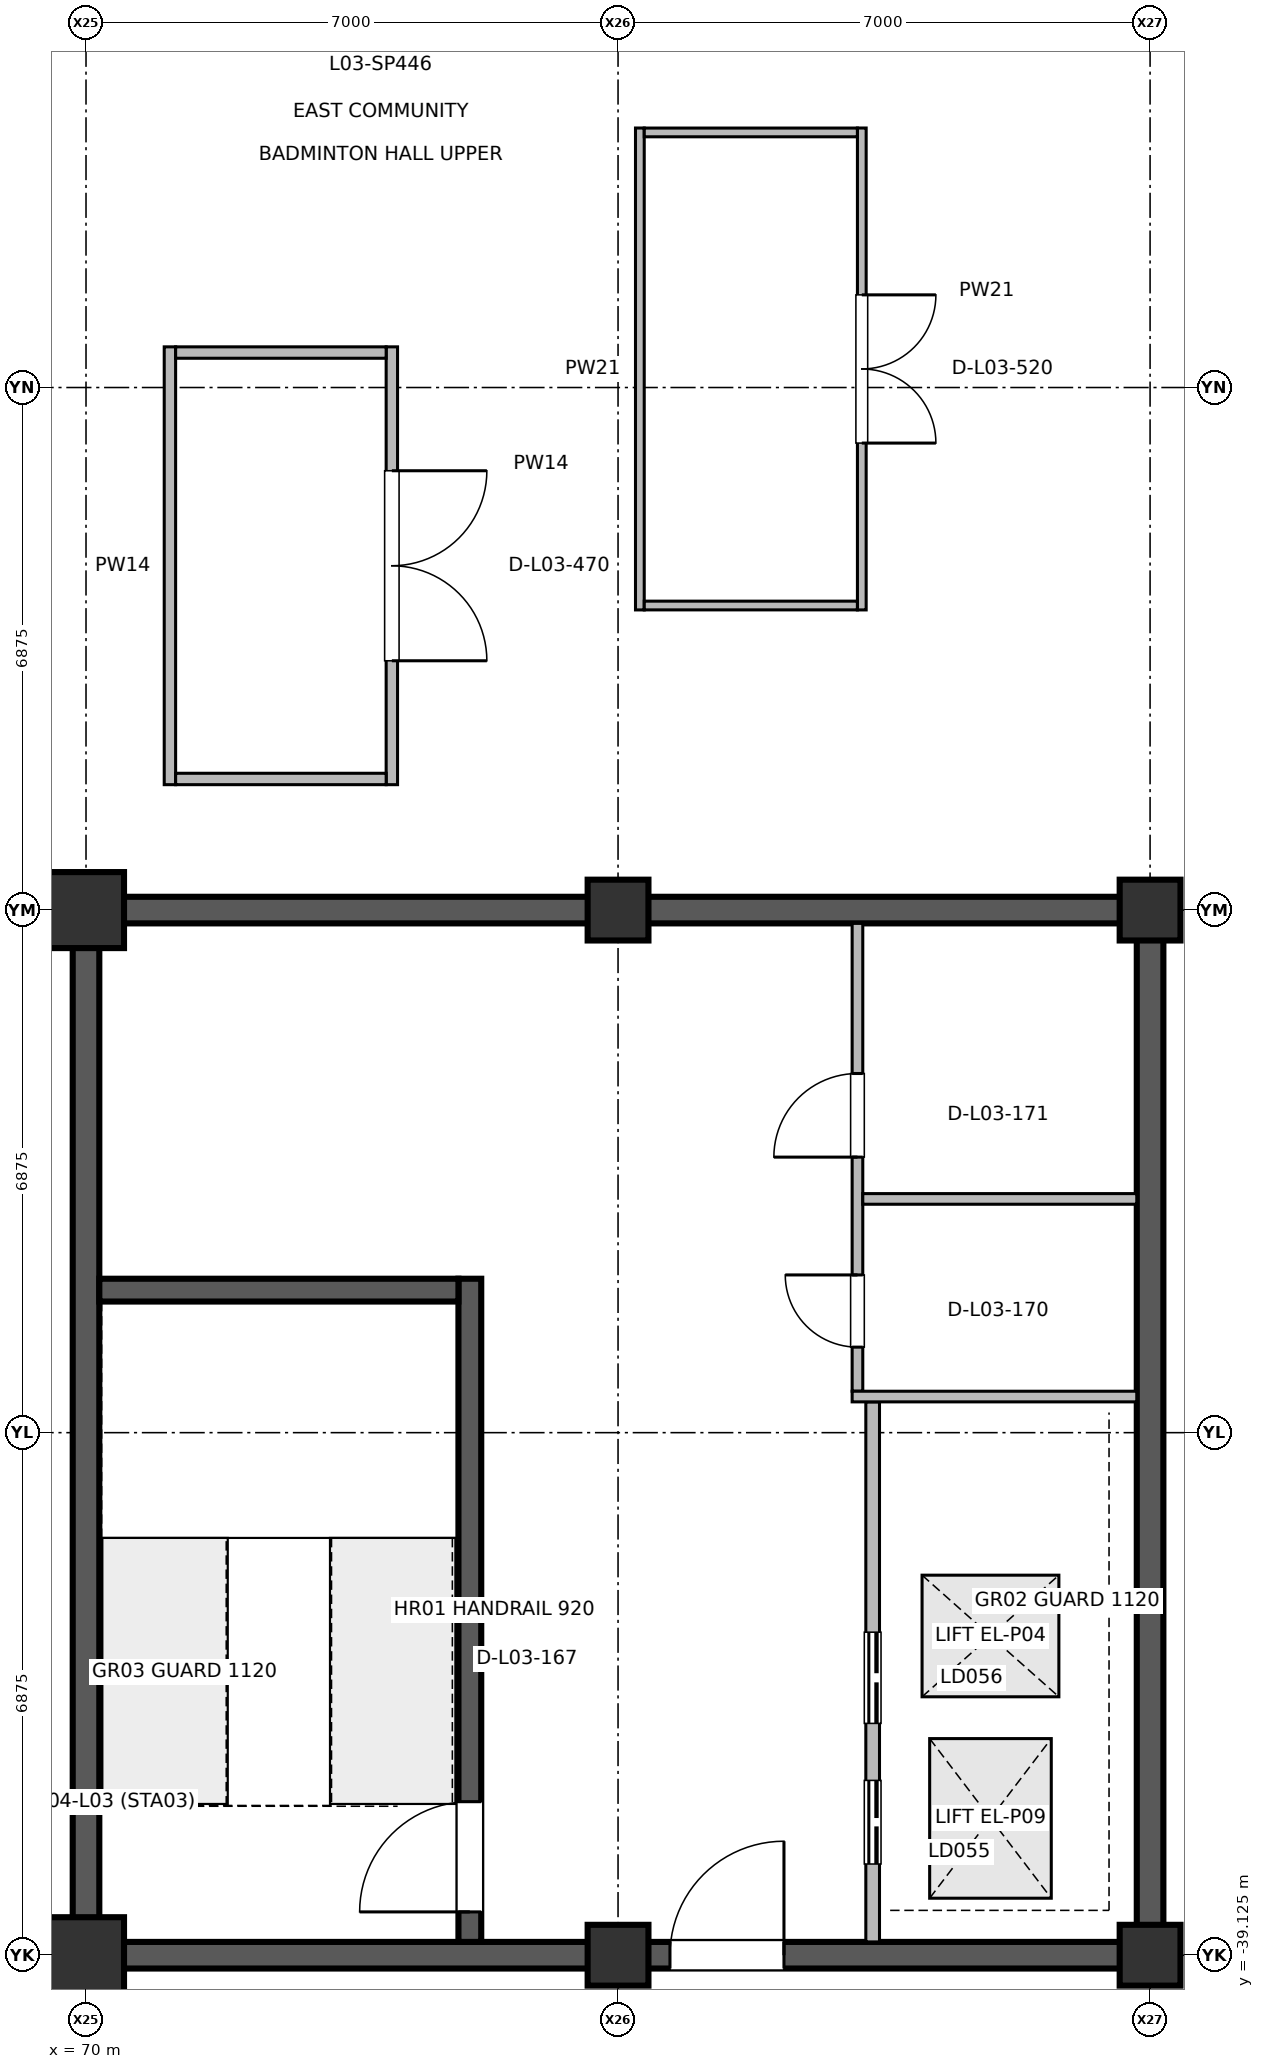
"""IFC4 building model, lengths in metres.
Left out: names, types, materials, properties, quantities, classifications, styles, units other than length and angle.
Written with IfcOpenShell. Run it as: python <this file> out.ifc"""

import sys

from ifc_helpers import new_model, si_unit, direction, frame, frame_2d, origin, origin_2d, place, context, subcontext, project, spatial, rectangle, extrude, element, fill, save


model = new_model("IFC4")
c1 = context("Model", 3, precision=1e-05, world=origin(), true_north=direction((0.0, 1.0)))
c2 = subcontext(c1, "Body", "Model", "MODEL_VIEW")
j1 = project(units=[si_unit("LENGTHUNIT", "METRE"), si_unit("PLANEANGLEUNIT", "RADIAN")], contexts=[c1])
p1 = place(None, origin())
s1 = spatial("IfcSite", under=j1, at=p1, CompositionType="ELEMENT")
p2 = place(p1, origin())
s2 = spatial("IfcBuilding", under=s1, at=p2, CompositionType="ELEMENT")
p3 = place(p2, frame((0.0, 0.0, 11.4)))
s3 = spatial("IfcBuildingStorey", under=s2, at=p3, CompositionType="ELEMENT", Elevation=11.4)
for number, where, z_axis, x_axis in (
    (1, (70.0, -39.125, 0.0), (0.0, 0.0, 1.0), (1.0, 0.0, 0.0)),
    (2, (70.0, -25.375, 0.0), (0.0, 0.0, 1.0), (1.0, 0.0, 0.0)),
):
    element("IfcColumn", number, at=place(p3, frame(where, z_axis=z_axis, x_axis=x_axis)), inside=s3, PredefinedType="COLUMN", context=c2, shape_type="SweptSolid", body=[
        extrude(rectangle(XDim=1.0, YDim=1.0, at=origin_2d()), origin(), (0.0, 0.0, 1.0), 4.798),
    ])
for number, where, z_axis, x_axis in (
    (3, (77.0, -39.125, 0.0), (0.0, 0.0, 1.0), (1.0, 0.0, 0.0)),
    (4, (77.0, -25.375, 0.0), (0.0, 0.0, 1.0), (1.0, 0.0, 0.0)),
    (5, (84.0, -39.125, 0.0), (0.0, 0.0, 1.0), (1.0, 0.0, 0.0)),
    (6, (84.0, -25.375, 0.0), (0.0, 0.0, 1.0), (1.0, 0.0, 0.0)),
):
    element("IfcColumn", number, at=place(p3, frame(where, z_axis=z_axis, x_axis=x_axis)), inside=s3, PredefinedType="COLUMN", context=c2, shape_type="SweptSolid", body=[
        extrude(rectangle(XDim=0.8, YDim=0.8, at=origin_2d()), origin(), (0.0, 0.0, 1.0), 4.798),
    ])
for number, where, z_axis, x_axis in (
    (7, (70.0, -38.95, 0.0), (0.0, 0.0, 1.0), (0.0, 1.0, 0.0)),
    (8, (84.0, -38.95, 0.0), (0.0, 0.0, 1.0), (0.0, 1.0, 0.0)),
):
    element("IfcWall", number, at=place(p3, frame(where, z_axis=z_axis, x_axis=x_axis)), inside=s3, PredefinedType="SHEAR", context=c2, shape_type="SweptSolid", body=[
        extrude(rectangle(XDim=13.4, YDim=0.35, at=frame_2d((6.7, 0.0))), origin(), (0.0, 0.0, 1.0), 4.58),
    ])
p4 = place(p3, frame((70.175, -39.125, 0.0), z_axis=(0.0, 0.0, 1.0), x_axis=(1.0, 0.0, 0.0)))
e9 = element("IfcWall", 9, at=p4, inside=s3, PredefinedType="SHEAR", context=c2, shape_type="SweptSolid", body=[
    extrude(rectangle(XDim=13.65, YDim=0.35, at=frame_2d((6.825, 0.0))), origin(), (0.0, 0.0, 1.0), 4.58),
])
p5 = place(p4, frame((7.508, 0.0, 0.0)))
e10 = element("IfcOpeningElement", 10, at=p5, cuts=e9, PredefinedType="OPENING", context=c2, shape_type="SweptSolid", body=[
    extrude(rectangle(XDim=1.5, YDim=2.2, at=frame_2d((0.75, 1.1))), frame((0.0, 0.185, 0.0), z_axis=(0.0, -1.0, 0.0), x_axis=(1.0, 0.0, 0.0)), (0.0, 0.0, 1.0), 0.37),
])
p6 = place(p3, frame((70.175, -25.375, 0.0), z_axis=(0.0, 0.0, 1.0), x_axis=(1.0, 0.0, 0.0)))
e11 = element("IfcWall", 11, at=p6, inside=s3, PredefinedType="SHEAR", context=c2, shape_type="SweptSolid", body=[
    extrude(rectangle(XDim=13.65, YDim=0.35, at=frame_2d((6.825, 0.0))), origin(), (0.0, 0.0, 1.0), 4.58),
])
p7 = place(p3, frame((75.05, -38.95, 0.0), z_axis=(0.0, 0.0, 1.0), x_axis=(0.0, 1.0, 0.0)))
e12 = element("IfcWall", 12, at=p7, inside=s3, PredefinedType="SHEAR", context=c2, shape_type="SweptSolid", body=[
    extrude(rectangle(XDim=8.725, YDim=0.3, at=frame_2d((4.362, 0.0))), origin(), (0.0, 0.0, 1.0), 4.58),
])
p8 = place(p7, frame((0.395, 0.0, 0.0)))
e13 = element("IfcOpeningElement", 13, at=p8, cuts=e12, PredefinedType="OPENING", context=c2, shape_type="SweptSolid", body=[
    extrude(rectangle(XDim=1.45, YDim=2.2, at=frame_2d((0.725, 1.1))), frame((0.0, 0.16, 0.0), z_axis=(0.0, -1.0, 0.0), x_axis=(1.0, 0.0, 0.0)), (0.0, 0.0, 1.0), 0.32),
])
p9 = place(p3, frame((80.35, -38.95, 0.0), z_axis=(0.0, 0.0, 1.0), x_axis=(0.0, 1.0, 0.0)))
e14 = element("IfcWall", 14, at=p9, inside=s3, PredefinedType="PARTITIONING", context=c2, shape_type="SweptSolid", body=[
    extrude(rectangle(XDim=7.105, YDim=0.18, at=frame_2d((3.552, 0.0))), origin(), (0.0, 0.0, 1.0), 3.82),
])
p10 = place(p9, frame((1.025, 0.0, 0.0)))
e15 = element("IfcOpeningElement", 15, at=p10, cuts=e14, PredefinedType="OPENING", context=c2, shape_type="SweptSolid", body=[
    extrude(rectangle(XDim=1.1, YDim=2.2, at=frame_2d((0.55, 1.1))), frame((0.0, 0.1, 0.0), z_axis=(0.0, -1.0, 0.0), x_axis=(1.0, 0.0, 0.0)), (0.0, 0.0, 1.0), 0.2),
])
p11 = place(p9, frame((2.875, 0.0, 0.0)))
e16 = element("IfcOpeningElement", 16, at=p11, cuts=e14, PredefinedType="OPENING", context=c2, shape_type="SweptSolid", body=[
    extrude(rectangle(XDim=1.2, YDim=2.25, at=frame_2d((0.6, 1.125))), frame((0.0, 0.1, 0.0), z_axis=(0.0, -1.0, 0.0), x_axis=(1.0, 0.0, 0.0)), (0.0, 0.0, 1.0), 0.2),
])
p12 = place(p3, frame((80.15, -31.705, 0.0), z_axis=(0.0, 0.0, 1.0), x_axis=(0.0, 1.0, 0.0)))
e17 = element("IfcWall", 17, at=p12, inside=s3, PredefinedType="PARTITIONING", context=c2, shape_type="SweptSolid", body=[
    extrude(rectangle(XDim=6.155, YDim=0.14, at=frame_2d((3.078, 0.0))), origin(), (0.0, 0.0, 1.0), 3.82),
])
p13 = place(p12, frame((0.58, 0.0, 0.0)))
e18 = element("IfcOpeningElement", 18, at=p13, cuts=e17, PredefinedType="OPENING", context=c2, shape_type="SweptSolid", body=[
    extrude(rectangle(XDim=0.95, YDim=2.15, at=frame_2d((0.475, 1.075))), frame((0.0, 0.08, 0.0), z_axis=(0.0, -1.0, 0.0), x_axis=(1.0, 0.0, 0.0)), (0.0, 0.0, 1.0), 0.16),
])
p14 = place(p12, frame((3.08, 0.0, 0.0)))
e19 = element("IfcOpeningElement", 19, at=p14, cuts=e17, PredefinedType="OPENING", context=c2, shape_type="SweptSolid", body=[
    extrude(rectangle(XDim=1.1, YDim=2.15, at=frame_2d((0.55, 1.075))), frame((0.0, 0.08, 0.0), z_axis=(0.0, -1.0, 0.0), x_axis=(1.0, 0.0, 0.0)), (0.0, 0.0, 1.0), 0.16),
])
p15 = place(p3, frame((74.024, -17.965, 0.0), z_axis=(0.0, 0.0, 1.0), x_axis=(0.0, -1.0, 0.0)))
e20 = element("IfcWall", 20, at=p15, inside=s3, PredefinedType="PARTITIONING", context=c2, shape_type="SweptSolid", body=[
    extrude(rectangle(XDim=5.76, YDim=0.15, at=frame_2d((2.88, 0.0))), origin(), (0.0, 0.0, 1.0), 3.82),
])
p16 = place(p15, frame((1.63, 0.0, 0.0)))
e21 = element("IfcOpeningElement", 21, at=p16, cuts=e20, PredefinedType="OPENING", context=c2, shape_type="SweptSolid", body=[
    extrude(rectangle(XDim=2.5, YDim=2.5, at=frame_2d((1.25, 1.25))), frame((0.0, 0.085, 0.0), z_axis=(0.0, -1.0, 0.0), x_axis=(1.0, 0.0, 0.0)), (0.0, 0.0, 1.0), 0.17),
])
p17 = place(p3, frame((80.207, -15.086, 0.0), z_axis=(0.0, 0.0, 1.0), x_axis=(0.0, -1.0, 0.0)))
e22 = element("IfcWall", 22, at=p17, inside=s3, PredefinedType="PARTITIONING", context=c2, shape_type="SweptSolid", body=[
    extrude(rectangle(XDim=6.34, YDim=0.115, at=frame_2d((3.17, 0.0))), origin(), (0.0, 0.0, 1.0), 3.82),
])
p18 = place(p17, frame((2.195, 0.0, 0.0)))
e23 = element("IfcOpeningElement", 23, at=p18, cuts=e22, PredefinedType="OPENING", context=c2, shape_type="SweptSolid", body=[
    extrude(rectangle(XDim=1.95, YDim=2.35, at=frame_2d((0.975, 1.175))), frame((0.0, 0.067, 0.0), z_axis=(0.0, -1.0, 0.0), x_axis=(1.0, 0.0, 0.0)), (0.0, 0.0, 1.0), 0.135),
])
p19 = place(p3, frame((80.08, -31.775, 0.0), z_axis=(0.0, 0.0, 1.0), x_axis=(1.0, 0.0, 0.0)))
e24 = element("IfcWall", 24, at=p19, inside=s3, PredefinedType="PARTITIONING", context=c2, shape_type="SweptSolid", body=[
    extrude(rectangle(XDim=3.745, YDim=0.14, at=frame_2d((1.873, 0.0))), origin(), (0.0, 0.0, 1.0), 3.82),
])
p20 = place(p3, frame((80.22, -29.175, 0.0), z_axis=(0.0, 0.0, 1.0), x_axis=(1.0, 0.0, 0.0)))
e25 = element("IfcWall", 25, at=p20, inside=s3, PredefinedType="PARTITIONING", context=c2, shape_type="SweptSolid", body=[
    extrude(rectangle(XDim=3.605, YDim=0.14, at=frame_2d((1.802, 0.0))), origin(), (0.0, 0.0, 1.0), 3.82),
])
p21 = place(p3, frame((71.104, -23.725, 0.0), z_axis=(0.0, 0.0, 1.0), x_axis=(0.0, 1.0, 0.0)))
e26 = element("IfcWall", 26, at=p21, inside=s3, PredefinedType="PARTITIONING", context=c2, shape_type="SweptSolid", body=[
    extrude(rectangle(XDim=5.76, YDim=0.15, at=frame_2d((2.88, 0.0))), origin(), (0.0, 0.0, 1.0), 3.82),
])
for number, where, z_axis, x_axis in (
    (27, (71.179, -23.65, 0.0), (0.0, 0.0, 1.0), (1.0, 0.0, 0.0)),
    (28, (71.179, -18.04, 0.0), (0.0, 0.0, 1.0), (1.0, 0.0, 0.0)),
):
    element("IfcWall", number, at=place(p3, frame(where, z_axis=z_axis, x_axis=x_axis)), inside=s3, PredefinedType="PARTITIONING", context=c2, shape_type="SweptSolid", body=[
        extrude(rectangle(XDim=2.77, YDim=0.15, at=frame_2d((1.385, 0.0))), origin(), (0.0, 0.0, 1.0), 3.82),
    ])
p22 = place(p3, frame((77.287, -21.426, 0.0), z_axis=(0.0, 0.0, 1.0), x_axis=(0.0, 1.0, 0.0)))
e29 = element("IfcWall", 29, at=p22, inside=s3, PredefinedType="PARTITIONING", context=c2, shape_type="SweptSolid", body=[
    extrude(rectangle(XDim=6.34, YDim=0.115, at=frame_2d((3.17, 0.0))), origin(), (0.0, 0.0, 1.0), 3.355),
])
for number, where, z_axis, x_axis in (
    (30, (77.345, -21.368, 0.0), (0.0, 0.0, 1.0), (1.0, 0.0, 0.0)),
    (31, (77.345, -15.144, 0.0), (0.0, 0.0, 1.0), (1.0, 0.0, 0.0)),
):
    element("IfcWall", number, at=place(p3, frame(where, z_axis=z_axis, x_axis=x_axis)), inside=s3, PredefinedType="PARTITIONING", context=c2, shape_type="SweptSolid", body=[
        extrude(rectangle(XDim=2.804, YDim=0.115, at=frame_2d((1.402, 0.0))), origin(), (0.0, 0.0, 1.0), 3.355),
    ])
p23 = place(p3, frame((70.175, -30.375, 0.0), z_axis=(0.0, 0.0, 1.0), x_axis=(1.0, 0.0, 0.0)))
e32 = element("IfcWall", 32, at=p23, inside=s3, PredefinedType="SHEAR", context=c2, shape_type="SweptSolid", body=[
    extrude(rectangle(XDim=4.725, YDim=0.3, at=frame_2d((2.362, 0.0))), origin(), (0.0, 0.0, 1.0), 4.58),
])
p24 = place(p5, origin())
e33 = element("IfcDoor", 33, at=p24, inside=s3, OperationType="SINGLE_SWING_RIGHT", PredefinedType="DOOR", context=c2, shape_type="SweptSolid", body=[
    extrude(rectangle(XDim=1.5, YDim=2.2, at=frame_2d((0.75, 1.1))), frame((0.0, 0.025, 0.0), z_axis=(0.0, -1.0, 0.0), x_axis=(1.0, 0.0, 0.0)), (0.0, 0.0, 1.0), 0.05),
])
fill(e10, e33)
p25 = place(p8, origin())
e34 = element("IfcDoor", 34, at=p25, inside=s3, OperationType="SINGLE_SWING_LEFT", PredefinedType="DOOR", context=c2, shape_type="SweptSolid", body=[
    extrude(rectangle(XDim=1.45, YDim=2.2, at=frame_2d((0.725, 1.1))), frame((0.0, 0.025, 0.0), z_axis=(0.0, -1.0, 0.0), x_axis=(1.0, 0.0, 0.0)), (0.0, 0.0, 1.0), 0.05),
])
fill(e13, e34)
p26 = place(p10, origin())
e35 = element("IfcDoor", 35, at=p26, inside=s3, OperationType="DOUBLE_DOOR_SLIDING", PredefinedType="DOOR", context=c2, shape_type="SweptSolid", body=[
    extrude(rectangle(XDim=1.1, YDim=2.2, at=frame_2d((0.55, 1.1))), frame((0.0, 0.025, 0.0), z_axis=(0.0, -1.0, 0.0), x_axis=(1.0, 0.0, 0.0)), (0.0, 0.0, 1.0), 0.05),
])
fill(e15, e35)
p27 = place(p11, origin())
e36 = element("IfcDoor", 36, at=p27, inside=s3, OperationType="DOUBLE_DOOR_SLIDING", PredefinedType="DOOR", context=c2, shape_type="SweptSolid", body=[
    extrude(rectangle(XDim=1.2, YDim=2.25, at=frame_2d((0.6, 1.125))), frame((0.0, 0.025, 0.0), z_axis=(0.0, -1.0, 0.0), x_axis=(1.0, 0.0, 0.0)), (0.0, 0.0, 1.0), 0.05),
])
fill(e16, e36)
p28 = place(p13, origin())
e37 = element("IfcDoor", 37, at=p28, inside=s3, OperationType="SINGLE_SWING_RIGHT", PredefinedType="DOOR", context=c2, shape_type="SweptSolid", body=[
    extrude(rectangle(XDim=0.95, YDim=2.15, at=frame_2d((0.475, 1.075))), frame((0.0, 0.025, 0.0), z_axis=(0.0, -1.0, 0.0), x_axis=(1.0, 0.0, 0.0)), (0.0, 0.0, 1.0), 0.05),
])
fill(e18, e37)
p29 = place(p14, origin())
e38 = element("IfcDoor", 38, at=p29, inside=s3, OperationType="SINGLE_SWING_LEFT", PredefinedType="DOOR", context=c2, shape_type="SweptSolid", body=[
    extrude(rectangle(XDim=1.1, YDim=2.15, at=frame_2d((0.55, 1.075))), frame((0.0, 0.025, 0.0), z_axis=(0.0, -1.0, 0.0), x_axis=(1.0, 0.0, 0.0)), (0.0, 0.0, 1.0), 0.05),
])
fill(e19, e38)
p30 = place(p16, origin())
e39 = element("IfcDoor", 39, at=p30, inside=s3, OperationType="DOUBLE_DOOR_SINGLE_SWING", PredefinedType="DOOR", context=c2, shape_type="SweptSolid", body=[
    extrude(rectangle(XDim=2.5, YDim=2.5, at=frame_2d((1.25, 1.25))), frame((0.0, 0.025, 0.0), z_axis=(0.0, -1.0, 0.0), x_axis=(1.0, 0.0, 0.0)), (0.0, 0.0, 1.0), 0.05),
])
fill(e21, e39)
p31 = place(p18, origin())
e40 = element("IfcDoor", 40, at=p31, inside=s3, OperationType="DOUBLE_DOOR_SINGLE_SWING", PredefinedType="DOOR", context=c2, shape_type="SweptSolid", body=[
    extrude(rectangle(XDim=1.95, YDim=2.35, at=frame_2d((0.975, 1.175))), frame((0.0, 0.025, 0.0), z_axis=(0.0, -1.0, 0.0), x_axis=(1.0, 0.0, 0.0)), (0.0, 0.0, 1.0), 0.05),
])
fill(e23, e40)
save(model, sys.argv[1])
